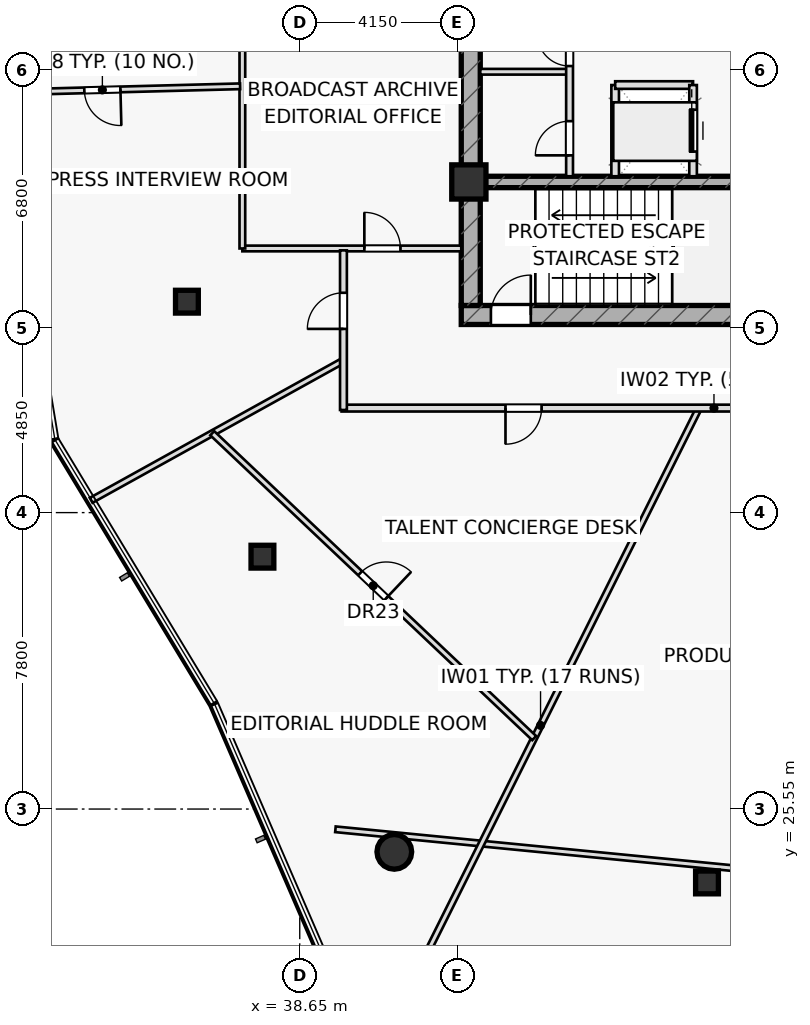
"""IFC4 building model, lengths in metres.
Left out: names, types, materials, properties, quantities, classifications, styles, units other than length and angle.
Written with IfcOpenShell. Run it as: python <this file> out.ifc"""

import sys

from ifc_helpers import new_model, si_unit, direction, frame, frame_2d, origin, origin_2d, place, context, subcontext, project, spatial, rectangle, hollow_rectangle, hollow_circle, extrude, element, fill, save


model = new_model("IFC4")
c1 = context("Model", 3, precision=1e-05, world=origin(), true_north=direction((0.0, 1.0)))
c2 = subcontext(c1, "Body", "Model", "MODEL_VIEW")
j1 = project(units=[si_unit("LENGTHUNIT", "METRE"), si_unit("PLANEANGLEUNIT", "RADIAN")], contexts=[c1])
p1 = place(None, origin())
s1 = spatial("IfcSite", under=j1, at=p1, CompositionType="ELEMENT")
p2 = place(p1, origin())
s2 = spatial("IfcBuilding", under=s1, at=p2, CompositionType="ELEMENT")
p3 = place(p2, frame((0.0, 0.0, 184.9)))
s3 = spatial("IfcBuildingStorey", under=s2, at=p3, CompositionType="ELEMENT", Elevation=184.9)
p4 = place(p3, frame((42.9, 38.55, 0.0), z_axis=(0.0, 0.0, 1.0), x_axis=(1.0, 0.0, 0.0)))
e1 = element("IfcWall", 1, at=p4, inside=s3, PredefinedType="SHEAR", context=c2, shape_type="SweptSolid", body=[
    extrude(rectangle(XDim=14.2, YDim=0.5, at=frame_2d((7.1, 0.0))), origin(), (0.0, 0.0, 1.0), 3.55),
])
p5 = place(p4, frame((0.78, 0.0, 0.0)))
e2 = element("IfcOpeningElement", 2, at=p5, cuts=e1, PredefinedType="OPENING", context=c2, shape_type="SweptSolid", body=[
    extrude(rectangle(XDim=1.05, YDim=2.2, at=frame_2d((0.525, 1.1))), frame((0.0, 0.26, 0.0), z_axis=(0.0, -1.0, 0.0), x_axis=(1.0, 0.0, 0.0)), (0.0, 0.0, 1.0), 0.52),
])
p6 = place(p3, frame((43.15, 38.8, 0.0), z_axis=(0.0, 0.0, 1.0), x_axis=(0.0, 1.0, 0.0)))
e3 = element("IfcWall", 3, at=p6, inside=s3, PredefinedType="SHEAR", context=c2, shape_type="SweptSolid", body=[
    extrude(rectangle(XDim=12.4, YDim=0.5, at=frame_2d((6.2, 0.0))), origin(), (0.0, 0.0, 1.0), 3.55),
])
p7 = place(p3, frame((43.4, 42.05, 0.0), z_axis=(0.0, 0.0, 1.0), x_axis=(1.0, 0.0, 0.0)))
e4 = element("IfcWall", 4, at=p7, inside=s3, PredefinedType="SHEAR", context=c2, shape_type="SweptSolid", body=[
    extrude(rectangle(XDim=13.2, YDim=0.3, at=frame_2d((6.6, 0.0))), origin(), (0.0, 0.0, 1.0), 3.55),
])
p8 = place(p7, frame((8.37, 0.0, 0.0)))
e5 = element("IfcOpeningElement", 5, at=p8, cuts=e4, PredefinedType="OPENING", context=c2, shape_type="SweptSolid", body=[
    extrude(rectangle(XDim=1.1, YDim=2.15, at=frame_2d((0.55, 1.075))), frame((0.0, 0.16, 0.0), z_axis=(0.0, -1.0, 0.0), x_axis=(1.0, 0.0, 0.0)), (0.0, 0.0, 1.0), 0.32),
])
p9 = place(p7, frame((10.09, 0.0, 0.0)))
e6 = element("IfcOpeningElement", 6, at=p9, cuts=e4, PredefinedType="OPENING", context=c2, shape_type="SweptSolid", body=[
    extrude(rectangle(XDim=1.1, YDim=2.15, at=frame_2d((0.55, 1.075))), frame((0.0, 0.16, 0.0), z_axis=(0.0, -1.0, 0.0), x_axis=(1.0, 0.0, 0.0)), (0.0, 0.0, 1.0), 0.32),
])
p10 = place(p7, frame((11.83, 0.0, 0.0)))
e7 = element("IfcOpeningElement", 7, at=p10, cuts=e4, PredefinedType="OPENING", context=c2, shape_type="SweptSolid", body=[
    extrude(rectangle(XDim=1.1, YDim=2.15, at=frame_2d((0.55, 1.075))), frame((0.0, 0.16, 0.0), z_axis=(0.0, -1.0, 0.0), x_axis=(1.0, 0.0, 0.0)), (0.0, 0.0, 1.0), 0.32),
])
p11 = place(p3, frame((43.1, 42.05, 0.0), z_axis=(0.0, 0.0, 1.0), x_axis=(1.0, 0.0, 0.0)))
e8 = element("IfcColumn", 8, at=p11, inside=s3, PredefinedType="COLUMN", context=c2, shape_type="SweptSolid", body=[
    extrude(rectangle(XDim=0.9, YDim=0.9, at=origin_2d()), origin(), (0.0, 0.0, 1.0), 3.55),
])
for number, where, z_axis, x_axis in (
    (9, (34.546, 45.399, 0.0), (0.0, 0.0, 1.0), (1.0, 0.0, 0.0)),
    (10, (35.681, 38.9, 0.0), (0.0, 0.0, 1.0), (1.0, 0.0, 0.0)),
    (11, (37.668, 32.19, 0.0), (0.0, 0.0, 1.0), (1.0, 0.0, 0.0)),
):
    element("IfcColumn", number, at=place(p3, frame(where, z_axis=z_axis, x_axis=x_axis)), inside=s3, PredefinedType="COLUMN", context=c2, shape_type="SweptSolid", body=[
        extrude(hollow_rectangle(XDim=0.6, YDim=0.6, WallThickness=0.036, at=origin_2d()), origin(), (0.0, 0.0, 1.0), 3.55),
    ])
p12 = place(p3, frame((41.139, 24.424, 0.0), z_axis=(0.0, 0.0, 1.0), x_axis=(1.0, 0.0, 0.0)))
e12 = element("IfcColumn", 12, at=p12, inside=s3, PredefinedType="COLUMN", context=c2, shape_type="SweptSolid", body=[
    extrude(hollow_circle(Radius=0.457, WallThickness=0.04, at=origin_2d()), origin(), (0.0, 0.0, 1.0), 3.55),
])
p13 = place(p3, frame((49.366, 23.619, 0.0), z_axis=(0.0, 0.0, 1.0), x_axis=(1.0, 0.0, 0.0)))
e13 = element("IfcColumn", 13, at=p13, inside=s3, PredefinedType="COLUMN", context=c2, shape_type="SweptSolid", body=[
    extrude(hollow_rectangle(XDim=0.6, YDim=0.6, WallThickness=0.036, at=origin_2d()), origin(), (0.0, 0.0, 1.0), 3.55),
])
p14 = place(p3, frame((46.95, 42.2, 0.0), z_axis=(0.0, 0.0, 1.0), x_axis=(0.0, 1.0, 0.0)))
e14 = element("IfcWall", 14, at=p14, inside=s3, PredefinedType="PARTITIONING", context=c2, shape_type="SweptSolid", body=[
    extrude(rectangle(XDim=2.4, YDim=0.2, at=frame_2d((1.2, 0.0))), origin(), (0.0, 0.0, 1.0), 3.55),
])
p15 = place(p3, frame((46.95, 44.6, 0.0), z_axis=(0.0, 0.0, 1.0), x_axis=(1.0, 0.0, 0.0)))
e15 = element("IfcWall", 15, at=p15, inside=s3, PredefinedType="PARTITIONING", context=c2, shape_type="SweptSolid", body=[
    extrude(rectangle(XDim=2.05, YDim=0.2, at=frame_2d((1.025, 0.0))), origin(), (0.0, 0.0, 1.0), 3.55),
])
p16 = place(p3, frame((43.4, 44.95, 0.0), z_axis=(0.0, 0.0, 1.0), x_axis=(1.0, 0.0, 0.0)))
e16 = element("IfcWall", 16, at=p16, inside=s3, PredefinedType="PARTITIONING", context=c2, shape_type="SweptSolid", body=[
    extrude(rectangle(XDim=2.35, YDim=0.15, at=frame_2d((1.175, 0.0))), origin(), (0.0, 0.0, 1.0), 3.55),
])
p17 = place(p3, frame((45.75, 42.2, 0.0), z_axis=(0.0, 0.0, 1.0), x_axis=(0.0, 1.0, 0.0)))
e17 = element("IfcWall", 17, at=p17, inside=s3, PredefinedType="PARTITIONING", context=c2, shape_type="SweptSolid", body=[
    extrude(rectangle(XDim=5.6, YDim=0.18, at=frame_2d((2.8, 0.0))), origin(), (0.0, 0.0, 1.0), 3.55),
])
p18 = place(p17, frame((0.55, 0.0, 0.0)))
e18 = element("IfcOpeningElement", 18, at=p18, cuts=e17, PredefinedType="OPENING", context=c2, shape_type="SweptSolid", body=[
    extrude(rectangle(XDim=0.9, YDim=2.05, at=frame_2d((0.45, 1.025))), frame((0.0, 0.1, 0.0), z_axis=(0.0, -1.0, 0.0), x_axis=(1.0, 0.0, 0.0)), (0.0, 0.0, 1.0), 0.2),
])
p19 = place(p17, frame((2.9, 0.0, 0.0)))
e19 = element("IfcOpeningElement", 19, at=p19, cuts=e17, PredefinedType="OPENING", context=c2, shape_type="SweptSolid", body=[
    extrude(rectangle(XDim=0.85, YDim=2.05, at=frame_2d((0.425, 1.025))), frame((0.0, 0.1, 0.0), z_axis=(0.0, -1.0, 0.0), x_axis=(1.0, 0.0, 0.0)), (0.0, 0.0, 1.0), 0.2),
])
p20 = place(p3, frame((39.589, 25.018, 0.0), z_axis=(0.0, 0.0, 1.0), x_axis=(0.99524905582, -0.097361783517, 0.0)))
e20 = element("IfcWall", 20, at=p20, inside=s3, PredefinedType="PARTITIONING", context=c2, shape_type="SweptSolid", body=[
    extrude(rectangle(XDim=11.467, YDim=0.15, at=frame_2d((5.733, 0.0))), origin(), (0.0, 0.0, 1.0), 2.935),
])
p21 = place(p3, frame((37.14, 40.3, 0.0), z_axis=(0.0, 0.0, 1.0), x_axis=(1.0, 0.0, 0.0)))
e21 = element("IfcWall", 21, at=p21, inside=s3, PredefinedType="PARTITIONING", context=c2, shape_type="SweptSolid", body=[
    extrude(rectangle(XDim=5.76, YDim=0.15, at=frame_2d((2.88, 0.0))), origin(), (0.0, 0.0, 1.0), 3.55),
])
p22 = place(p21, frame((3.21, 0.0, 0.0)))
e22 = element("IfcOpeningElement", 22, at=p22, cuts=e21, PredefinedType="OPENING", context=c2, shape_type="SweptSolid", body=[
    extrude(rectangle(XDim=0.95, YDim=2.05, at=frame_2d((0.475, 1.025))), frame((0.0, 0.085, 0.0), z_axis=(0.0, -1.0, 0.0), x_axis=(1.0, 0.0, 0.0)), (0.0, 0.0, 1.0), 0.17),
])
p23 = place(p3, frame((37.14, 40.3, 0.0), z_axis=(0.0, 0.0, 1.0), x_axis=(0.0, 1.0, 0.0)))
e23 = element("IfcWall", 23, at=p23, inside=s3, PredefinedType="PARTITIONING", context=c2, shape_type="SweptSolid", body=[
    extrude(rectangle(XDim=7.58, YDim=0.15, at=frame_2d((3.79, 0.0))), origin(), (0.0, 0.0, 1.0), 2.935),
])
p24 = place(p3, frame((37.08, 44.567, 0.0), z_axis=(0.0, 0.0, 1.0), x_axis=(-0.999658109606, -0.026146967282, 0.0)))
e24 = element("IfcWall", 24, at=p24, inside=s3, PredefinedType="PARTITIONING", context=c2, shape_type="SweptSolid", body=[
    extrude(rectangle(XDim=6.191, YDim=0.15, at=frame_2d((3.095, 0.0))), origin(), (0.0, 0.0, 1.0), 3.025),
])
p25 = place(p24, frame((3.15, 0.0, 0.0)))
e25 = element("IfcOpeningElement", 25, at=p25, cuts=e24, PredefinedType="OPENING", context=c2, shape_type="SweptSolid", body=[
    extrude(rectangle(XDim=0.95, YDim=2.05, at=frame_2d((0.475, 1.025))), frame((0.0, 0.085, 0.0), z_axis=(0.0, -1.0, 0.0), x_axis=(1.0, 0.0, 0.0)), (0.0, 0.0, 1.0), 0.17),
])
p26 = place(p3, frame((39.8, 37.352, 0.0), z_axis=(0.0, 0.0, 1.0), x_axis=(-0.874672623568, -0.484714144193, 0.0)))
e26 = element("IfcWall", 26, at=p26, inside=s3, PredefinedType="PARTITIONING", context=c2, shape_type="SweptSolid", body=[
    extrude(rectangle(XDim=7.59, YDim=0.15, at=frame_2d((3.795, 0.0))), origin(), (0.0, 0.0, 1.0), 3.025),
])
p27 = place(p3, frame((49.156, 36.1, 0.0), z_axis=(0.0, 0.0, 1.0), x_axis=(-0.446742672299, -0.894662497676, 0.0)))
e27 = element("IfcWall", 27, at=p27, inside=s3, PredefinedType="PARTITIONING", context=c2, shape_type="SweptSolid", body=[
    extrude(rectangle(XDim=18.666, YDim=0.15, at=frame_2d((9.333, 0.0))), origin(), (0.0, 0.0, 1.0), 2.935),
])
p28 = place(p3, frame((36.348, 35.439, 0.0), z_axis=(0.0, 0.0, 1.0), x_axis=(0.726094522042, -0.687594898949, 0.0)))
e28 = element("IfcWall", 28, at=p28, inside=s3, PredefinedType="PARTITIONING", context=c2, shape_type="SweptSolid", body=[
    extrude(rectangle(XDim=11.668, YDim=0.15, at=frame_2d((5.834, 0.0))), origin(), (0.0, 0.0, 1.0), 2.935),
])
p29 = place(p28, frame((5.359, 0.0, 0.0)))
e29 = element("IfcOpeningElement", 29, at=p29, cuts=e28, PredefinedType="OPENING", context=c2, shape_type="SweptSolid", body=[
    extrude(rectangle(XDim=0.95, YDim=2.05, at=frame_2d((0.475, 1.025))), frame((0.0, 0.085, 0.0), z_axis=(0.0, -1.0, 0.0), x_axis=(1.0, 0.0, 0.0)), (0.0, 0.0, 1.0), 0.17),
])
p30 = place(p3, frame((59.35, 36.1, 0.0), z_axis=(0.0, 0.0, 1.0), x_axis=(-1.0, 0.0, 0.0)))
e30 = element("IfcWall", 30, at=p30, inside=s3, PredefinedType="PARTITIONING", context=c2, shape_type="SweptSolid", body=[
    extrude(rectangle(XDim=19.6, YDim=0.18, at=frame_2d((9.8, 0.0))), origin(), (0.0, 0.0, 1.0), 2.935),
])
p31 = place(p30, frame((1.042, 0.0, 0.0)))
e31 = element("IfcOpeningElement", 31, at=p31, cuts=e30, PredefinedType="OPENING", context=c2, shape_type="SweptSolid", body=[
    extrude(rectangle(XDim=0.95, YDim=2.05, at=frame_2d((0.475, 1.025))), frame((0.0, 0.1, 0.0), z_axis=(0.0, -1.0, 0.0), x_axis=(1.0, 0.0, 0.0)), (0.0, 0.0, 1.0), 0.2),
])
p32 = place(p30, frame((6.048, 0.0, 0.0)))
e32 = element("IfcOpeningElement", 32, at=p32, cuts=e30, PredefinedType="OPENING", context=c2, shape_type="SweptSolid", body=[
    extrude(rectangle(XDim=0.95, YDim=2.05, at=frame_2d((0.475, 1.025))), frame((0.0, 0.1, 0.0), z_axis=(0.0, -1.0, 0.0), x_axis=(1.0, 0.0, 0.0)), (0.0, 0.0, 1.0), 0.2),
])
p33 = place(p30, frame((14.336, 0.0, 0.0)))
e33 = element("IfcOpeningElement", 33, at=p33, cuts=e30, PredefinedType="OPENING", context=c2, shape_type="SweptSolid", body=[
    extrude(rectangle(XDim=0.95, YDim=2.05, at=frame_2d((0.475, 1.025))), frame((0.0, 0.1, 0.0), z_axis=(0.0, -1.0, 0.0), x_axis=(1.0, 0.0, 0.0)), (0.0, 0.0, 1.0), 0.2),
])
p34 = place(p3, frame((39.8, 36.05, 0.0), z_axis=(0.0, 0.0, 1.0), x_axis=(0.0, 1.0, 0.0)))
e34 = element("IfcWall", 34, at=p34, inside=s3, PredefinedType="PARTITIONING", context=c2, shape_type="SweptSolid", body=[
    extrude(rectangle(XDim=4.2, YDim=0.18, at=frame_2d((2.1, 0.0))), origin(), (0.0, 0.0, 1.0), 2.935),
])
p35 = place(p34, frame((2.134, 0.0, 0.0)))
e35 = element("IfcOpeningElement", 35, at=p35, cuts=e34, PredefinedType="OPENING", context=c2, shape_type="SweptSolid", body=[
    extrude(rectangle(XDim=0.95, YDim=2.05, at=frame_2d((0.475, 1.025))), frame((0.0, 0.1, 0.0), z_axis=(0.0, -1.0, 0.0), x_axis=(1.0, 0.0, 0.0)), (0.0, 0.0, 1.0), 0.2),
])
p36 = place(p3, frame((49.0, 42.2, 0.0), z_axis=(0.0, 0.0, 1.0), x_axis=(0.0, 1.0, 0.0)))
e36 = element("IfcWall", 36, at=p36, inside=s3, PredefinedType="PARTITIONING", context=c2, shape_type="SweptSolid", body=[
    extrude(rectangle(XDim=2.4, YDim=0.2, at=frame_2d((1.2, 0.0))), origin(), (0.0, 0.0, 1.0), 3.55),
])
p37 = place(p36, frame((0.65, 0.0, 0.0)))
e37 = element("IfcOpeningElement", 37, at=p37, cuts=e36, PredefinedType="OPENING", context=c2, shape_type="SweptSolid", body=[
    extrude(rectangle(XDim=1.1, YDim=2.15, at=frame_2d((0.55, 1.075))), frame((0.0, 0.11, 0.0), z_axis=(0.0, -1.0, 0.0), x_axis=(1.0, 0.0, 0.0)), (0.0, 0.0, 1.0), 0.22),
])
p38 = place(p5, origin())
e38 = element("IfcDoor", 38, at=p38, inside=s3, OperationType="SINGLE_SWING_RIGHT", PredefinedType="DOOR", context=c2, shape_type="SweptSolid", body=[
    extrude(rectangle(XDim=1.05, YDim=2.2, at=frame_2d((0.525, 1.1))), frame((0.0, 0.025, 0.0), z_axis=(0.0, -1.0, 0.0), x_axis=(1.0, 0.0, 0.0)), (0.0, 0.0, 1.0), 0.05),
])
fill(e2, e38)
p39 = place(p18, origin())
e39 = element("IfcDoor", 39, at=p39, inside=s3, OperationType="SINGLE_SWING_LEFT", PredefinedType="DOOR", context=c2, shape_type="SweptSolid", body=[
    extrude(rectangle(XDim=0.9, YDim=2.05, at=frame_2d((0.45, 1.025))), frame((0.0, 0.025, 0.0), z_axis=(0.0, -1.0, 0.0), x_axis=(1.0, 0.0, 0.0)), (0.0, 0.0, 1.0), 0.05),
])
fill(e18, e39)
p40 = place(p19, origin())
e40 = element("IfcDoor", 40, at=p40, inside=s3, OperationType="SINGLE_SWING_RIGHT", PredefinedType="DOOR", context=c2, shape_type="SweptSolid", body=[
    extrude(rectangle(XDim=0.85, YDim=2.05, at=frame_2d((0.425, 1.025))), frame((0.0, 0.025, 0.0), z_axis=(0.0, -1.0, 0.0), x_axis=(1.0, 0.0, 0.0)), (0.0, 0.0, 1.0), 0.05),
])
fill(e19, e40)
p41 = place(p22, origin())
e41 = element("IfcDoor", 41, at=p41, inside=s3, OperationType="SINGLE_SWING_LEFT", PredefinedType="DOOR", context=c2, shape_type="SweptSolid", body=[
    extrude(rectangle(XDim=0.95, YDim=2.05, at=frame_2d((0.475, 1.025))), frame((0.0, 0.025, 0.0), z_axis=(0.0, -1.0, 0.0), x_axis=(1.0, 0.0, 0.0)), (0.0, 0.0, 1.0), 0.05),
])
fill(e22, e41)
p42 = place(p25, origin())
e42 = element("IfcDoor", 42, at=p42, inside=s3, OperationType="SINGLE_SWING_LEFT", PredefinedType="DOOR", context=c2, shape_type="SweptSolid", body=[
    extrude(rectangle(XDim=0.95, YDim=2.05, at=frame_2d((0.475, 1.025))), frame((0.0, 0.025, 0.0), z_axis=(0.0, -1.0, 0.0), x_axis=(1.0, 0.0, 0.0)), (0.0, 0.0, 1.0), 0.05),
])
fill(e25, e42)
p43 = place(p29, origin())
e43 = element("IfcDoor", 43, at=p43, inside=s3, OperationType="SINGLE_SWING_RIGHT", PredefinedType="DOOR", context=c2, shape_type="SweptSolid", body=[
    extrude(rectangle(XDim=0.95, YDim=2.05, at=frame_2d((0.475, 1.025))), frame((0.0, 0.025, 0.0), z_axis=(0.0, -1.0, 0.0), x_axis=(1.0, 0.0, 0.0)), (0.0, 0.0, 1.0), 0.05),
])
fill(e29, e43)
p44 = place(p33, origin())
e44 = element("IfcDoor", 44, at=p44, inside=s3, OperationType="SINGLE_SWING_RIGHT", PredefinedType="DOOR", context=c2, shape_type="SweptSolid", body=[
    extrude(rectangle(XDim=0.95, YDim=2.05, at=frame_2d((0.475, 1.025))), frame((0.0, 0.025, 0.0), z_axis=(0.0, -1.0, 0.0), x_axis=(1.0, 0.0, 0.0)), (0.0, 0.0, 1.0), 0.05),
])
fill(e33, e44)
p45 = place(p35, origin())
e45 = element("IfcDoor", 45, at=p45, inside=s3, OperationType="SINGLE_SWING_LEFT", PredefinedType="DOOR", context=c2, shape_type="SweptSolid", body=[
    extrude(rectangle(XDim=0.95, YDim=2.05, at=frame_2d((0.475, 1.025))), frame((0.0, 0.025, 0.0), z_axis=(0.0, -1.0, 0.0), x_axis=(1.0, 0.0, 0.0)), (0.0, 0.0, 1.0), 0.05),
])
fill(e35, e45)
p46 = place(p37, origin())
e46 = element("IfcDoor", 46, at=p46, inside=s3, OperationType="SLIDING_TO_RIGHT", PredefinedType="DOOR", context=c2, shape_type="SweptSolid", body=[
    extrude(rectangle(XDim=1.1, YDim=2.15, at=frame_2d((0.55, 1.075))), frame((0.0, 0.025, 0.0), z_axis=(0.0, -1.0, 0.0), x_axis=(1.0, 0.0, 0.0)), (0.0, 0.0, 1.0), 0.05),
])
fill(e37, e46)
save(model, sys.argv[1])
